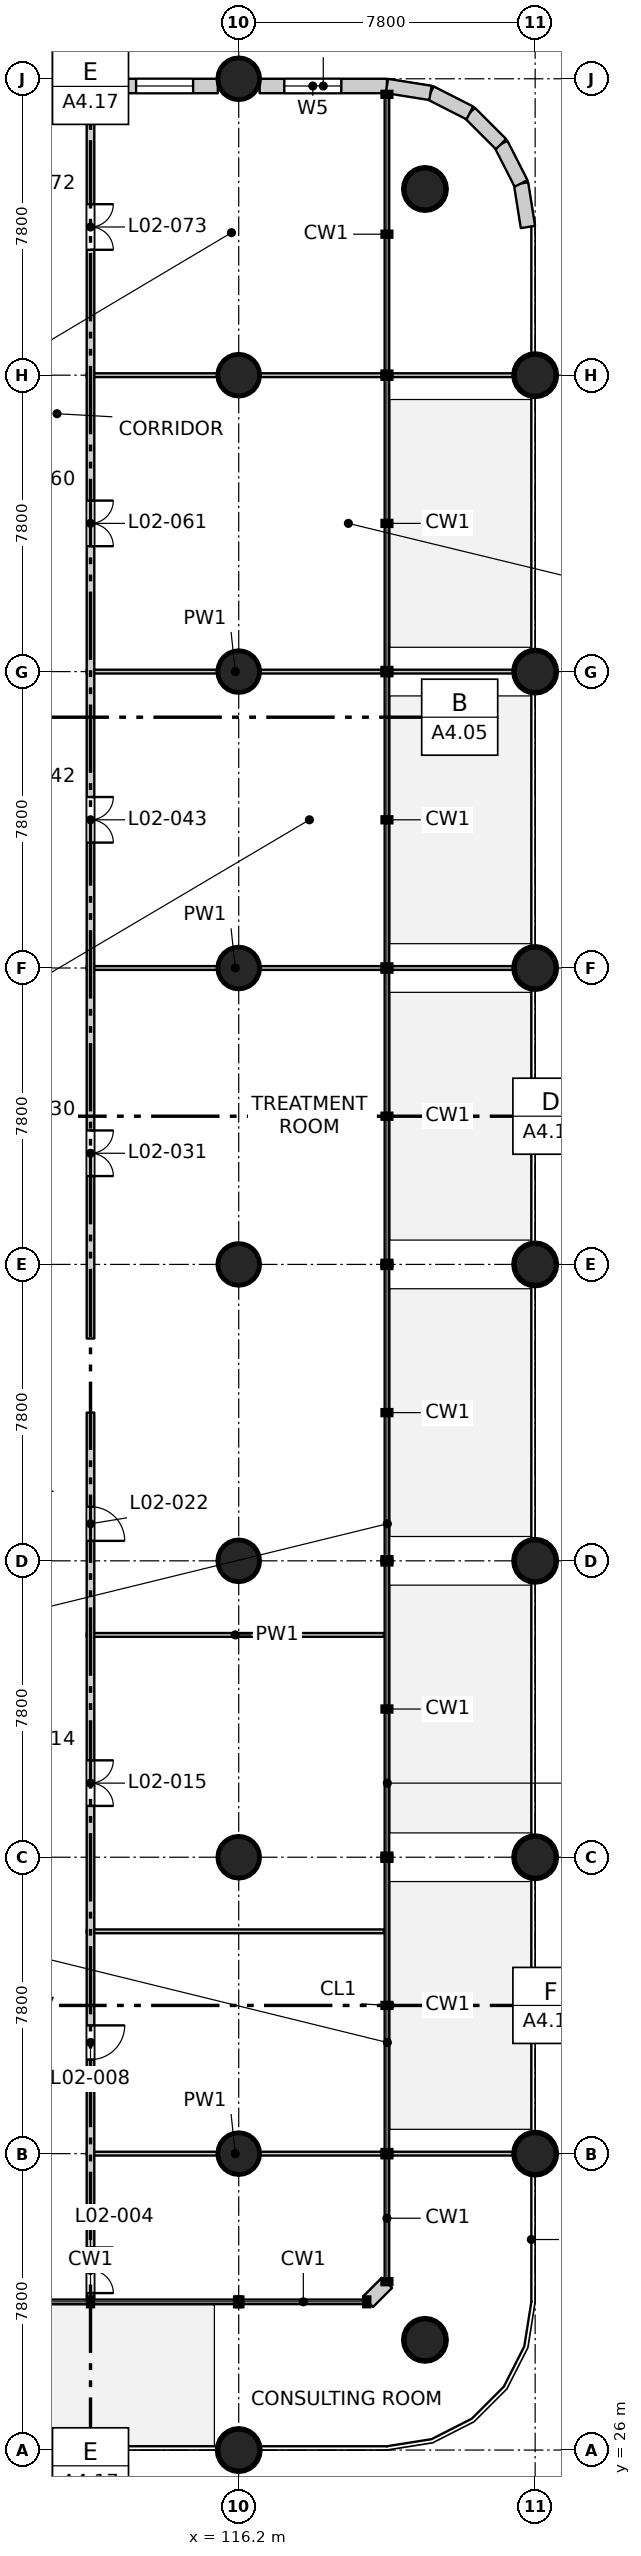
"""IFC4 building model, lengths in metres.
Left out: names, types, materials, properties, quantities, classifications, styles, units other than length and angle.
Written with IfcOpenShell. Run it as: python <this file> out.ifc"""

import sys

from ifc_helpers import new_model, si_unit, direction, frame, frame_2d, origin, origin_2d, place, context, subcontext, project, spatial, rectangle, circle, extrude, element, fill, save


model = new_model("IFC4")
c1 = context("Model", 3, precision=1e-05, world=origin(), true_north=direction((0.0, 1.0)))
c2 = subcontext(c1, "Body", "Model", "MODEL_VIEW")
j1 = project(units=[si_unit("LENGTHUNIT", "METRE"), si_unit("PLANEANGLEUNIT", "RADIAN")], contexts=[c1])
p1 = place(None, origin())
s1 = spatial("IfcSite", under=j1, at=p1, CompositionType="ELEMENT")
p2 = place(p1, origin())
s2 = spatial("IfcBuilding", under=s1, at=p2, CompositionType="ELEMENT")
p3 = place(p2, frame((0.0, 0.0, 10.5)))
s3 = spatial("IfcBuildingStorey", under=s2, at=p3, CompositionType="ELEMENT", Elevation=10.5)
for number, where, z_axis, x_axis in (
    (1, (116.2, 26.0, -0.3), (0.0, 0.0, 1.0), (1.0, 0.0, 0.0)),
    (2, (116.2, 33.8, -0.3), (0.0, 0.0, 1.0), (1.0, 0.0, 0.0)),
    (3, (116.2, 41.6, -0.3), (0.0, 0.0, 1.0), (1.0, 0.0, 0.0)),
    (4, (116.2, 49.4, -0.3), (0.0, 0.0, 1.0), (1.0, 0.0, 0.0)),
    (5, (116.2, 57.2, -0.3), (0.0, 0.0, 1.0), (1.0, 0.0, 0.0)),
    (6, (116.2, 65.0, -0.3), (0.0, 0.0, 1.0), (1.0, 0.0, 0.0)),
    (7, (116.2, 72.8, -0.3), (0.0, 0.0, 1.0), (1.0, 0.0, 0.0)),
    (8, (116.2, 80.6, -0.3), (0.0, 0.0, 1.0), (1.0, 0.0, 0.0)),
    (9, (116.2, 88.4, -0.3), (0.0, 0.0, 1.0), (1.0, 0.0, 0.0)),
    (10, (121.1, 28.9, -0.3), (0.0, 0.0, 1.0), (1.0, 0.0, 0.0)),
    (11, (124.0, 33.8, -0.3), (0.0, 0.0, 1.0), (1.0, 0.0, 0.0)),
    (12, (124.0, 41.6, -0.3), (0.0, 0.0, 1.0), (1.0, 0.0, 0.0)),
    (13, (124.0, 49.4, -0.3), (0.0, 0.0, 1.0), (1.0, 0.0, 0.0)),
    (14, (124.0, 57.2, -0.3), (0.0, 0.0, 1.0), (1.0, 0.0, 0.0)),
    (15, (124.0, 65.0, -0.3), (0.0, 0.0, 1.0), (1.0, 0.0, 0.0)),
    (16, (124.0, 72.8, -0.3), (0.0, 0.0, 1.0), (1.0, 0.0, 0.0)),
    (17, (124.0, 80.6, -0.3), (0.0, 0.0, 1.0), (1.0, 0.0, 0.0)),
    (18, (121.1, 85.5, -0.3), (0.0, 0.0, 1.0), (1.0, 0.0, 0.0)),
):
    element("IfcColumn", number, at=place(p3, frame(where, z_axis=z_axis, x_axis=x_axis)), inside=s3, PredefinedType="COLUMN", context=c2, shape_type="SweptSolid", body=[
        extrude(circle(Radius=0.55, at=origin_2d()), origin(), (0.0, 0.0, 1.0), 4.45),
    ])
p4 = place(p3, frame((119.6, 29.9, 0.0), z_axis=(0.0, 0.0, 1.0), x_axis=(0.707106781187, 0.707106781187, 0.0)))
e19 = element("IfcWall", 19, at=p4, inside=s3, PredefinedType="SOLIDWALL", context=c2, shape_type="SweptSolid", body=[
    extrude(rectangle(XDim=0.707, YDim=0.38, at=frame_2d((0.354, 0.0))), origin(), (0.0, 0.0, 1.0), 3.7),
])
p5 = place(p3, frame((101.2, 88.21, 0.0), z_axis=(0.0, 0.0, 1.0), x_axis=(1.0, 0.0, 0.0)))
e20 = element("IfcWall", 20, at=p5, inside=s3, PredefinedType="SOLIDWALL", context=c2, shape_type="SweptSolid", body=[
    extrude(rectangle(XDim=14.45, YDim=0.38, at=frame_2d((7.225, 0.0))), origin(), (0.0, 0.0, 1.0), 3.7),
])
p6 = place(p5, frame((0.6, 0.0, 0.9)))
e21 = element("IfcOpeningElement", 21, at=p6, cuts=e20, PredefinedType="OPENING", context=c2, shape_type="SweptSolid", body=[
    extrude(rectangle(XDim=1.5, YDim=1.5, at=frame_2d((0.75, 0.75))), frame((0.0, 0.2, 0.0), z_axis=(0.0, -1.0, 0.0), x_axis=(1.0, 0.0, 0.0)), (0.0, 0.0, 1.0), 0.4),
])
p7 = place(p5, frame((4.5, 0.0, 0.9)))
e22 = element("IfcOpeningElement", 22, at=p7, cuts=e20, PredefinedType="OPENING", context=c2, shape_type="SweptSolid", body=[
    extrude(rectangle(XDim=1.5, YDim=1.5, at=frame_2d((0.75, 0.75))), frame((0.0, 0.2, 0.0), z_axis=(0.0, -1.0, 0.0), x_axis=(1.0, 0.0, 0.0)), (0.0, 0.0, 1.0), 0.4),
])
p8 = place(p5, frame((12.3, 0.0, 0.9)))
e23 = element("IfcOpeningElement", 23, at=p8, cuts=e20, PredefinedType="OPENING", context=c2, shape_type="SweptSolid", body=[
    extrude(rectangle(XDim=1.5, YDim=1.5, at=frame_2d((0.75, 0.75))), frame((0.0, 0.2, 0.0), z_axis=(0.0, -1.0, 0.0), x_axis=(1.0, 0.0, 0.0)), (0.0, 0.0, 1.0), 0.4),
])
p9 = place(p3, frame((116.75, 88.21, 0.0), z_axis=(0.0, 0.0, 1.0), x_axis=(1.0, 0.0, 0.0)))
e24 = element("IfcWall", 24, at=p9, inside=s3, PredefinedType="SOLIDWALL", context=c2, shape_type="SweptSolid", body=[
    extrude(rectangle(XDim=3.35, YDim=0.38, at=frame_2d((1.675, 0.0))), origin(), (0.0, 0.0, 1.0), 3.7),
])
p10 = place(p9, frame((0.65, 0.0, 0.9)))
e25 = element("IfcOpeningElement", 25, at=p10, cuts=e24, PredefinedType="OPENING", context=c2, shape_type="SweptSolid", body=[
    extrude(rectangle(XDim=1.5, YDim=1.5, at=frame_2d((0.75, 0.75))), frame((0.0, 0.2, 0.0), z_axis=(0.0, -1.0, 0.0), x_axis=(1.0, 0.0, 0.0)), (0.0, 0.0, 1.0), 0.4),
])
p11 = place(p3, frame((123.81, 84.5, 0.0), z_axis=(0.0, 0.0, 1.0), x_axis=(-0.156480971952, 0.987680973502, 0.0)))
e26 = element("IfcWall", 26, at=p11, inside=s3, PredefinedType="SOLIDWALL", context=c2, shape_type="SweptSolid", body=[
    extrude(rectangle(XDim=1.161, YDim=0.38, at=frame_2d((0.581, 0.0))), origin(), (0.0, 0.0, 1.0), 3.7),
])
p12 = place(p3, frame((123.628, 85.646, 0.0), z_axis=(0.0, 0.0, 1.0), x_axis=(-0.453932083539, 0.891036286317, 0.0)))
e27 = element("IfcWall", 27, at=p12, inside=s3, PredefinedType="SOLIDWALL", context=c2, shape_type="SweptSolid", body=[
    extrude(rectangle(XDim=1.161, YDim=0.38, at=frame_2d((0.58, 0.0))), origin(), (0.0, 0.0, 1.0), 3.7),
])
for number, where, z_axis, x_axis in (
    (28, (123.102, 86.681, 0.0), (0.0, 0.0, 1.0), (-0.707, 0.707, 0.0)),
    (29, (122.281, 87.501, 0.0), (0.0, 0.0, 1.0), (-0.891, 0.454, 0.0)),
):
    element("IfcWall", number, at=place(p3, frame(where, z_axis=z_axis, x_axis=x_axis)), inside=s3, PredefinedType="SOLIDWALL", context=c2, shape_type="SweptSolid", body=[
        extrude(rectangle(XDim=1.161, YDim=0.38, at=frame_2d((0.581, 0.0))), origin(), (0.0, 0.0, 1.0), 3.7),
    ])
p13 = place(p3, frame((121.246, 88.028, 0.0), z_axis=(0.0, 0.0, 1.0), x_axis=(-0.987675821844, 0.156513484867, 0.0)))
e30 = element("IfcWall", 30, at=p13, inside=s3, PredefinedType="SOLIDWALL", context=c2, shape_type="SweptSolid", body=[
    extrude(rectangle(XDim=1.161, YDim=0.38, at=frame_2d((0.58, 0.0))), origin(), (0.0, 0.0, 1.0), 3.7),
])
p14 = place(p3, frame((112.2, 33.8, 0.0), z_axis=(0.0, 0.0, 1.0), x_axis=(1.0, 0.0, 0.0)))
e31 = element("IfcWall", 31, at=p14, inside=s3, PredefinedType="PARTITIONING", context=c2, shape_type="SweptSolid", body=[
    extrude(rectangle(XDim=7.82, YDim=0.1, at=frame_2d((3.91, 0.0))), origin(), (0.0, 0.0, 1.0), 4.15),
])
p15 = place(p3, frame((120.18, 33.8, 0.0), z_axis=(0.0, 0.0, 1.0), x_axis=(1.0, 0.0, 0.0)))
e32 = element("IfcWall", 32, at=p15, inside=s3, PredefinedType="PARTITIONING", context=c2, shape_type="SweptSolid", body=[
    extrude(rectangle(XDim=3.52, YDim=0.1, at=frame_2d((1.76, 0.0))), origin(), (0.0, 0.0, 1.0), 4.15),
])
p16 = place(p3, frame((112.2, 39.65, 0.0), z_axis=(0.0, 0.0, 1.0), x_axis=(1.0, 0.0, 0.0)))
e33 = element("IfcWall", 33, at=p16, inside=s3, PredefinedType="PARTITIONING", context=c2, shape_type="SweptSolid", body=[
    extrude(rectangle(XDim=7.82, YDim=0.1, at=frame_2d((3.91, 0.0))), origin(), (0.0, 0.0, 1.0), 4.15),
])
p17 = place(p3, frame((120.18, 39.65, 0.0), z_axis=(0.0, 0.0, 1.0), x_axis=(1.0, 0.0, 0.0)))
e34 = element("IfcWall", 34, at=p17, inside=s3, PredefinedType="PARTITIONING", context=c2, shape_type="SweptSolid", body=[
    extrude(rectangle(XDim=3.52, YDim=0.1, at=frame_2d((1.76, 0.0))), origin(), (0.0, 0.0, 1.0), 4.15),
])
p18 = place(p3, frame((112.2, 47.45, 0.0), z_axis=(0.0, 0.0, 1.0), x_axis=(1.0, 0.0, 0.0)))
e35 = element("IfcWall", 35, at=p18, inside=s3, PredefinedType="PARTITIONING", context=c2, shape_type="SweptSolid", body=[
    extrude(rectangle(XDim=7.82, YDim=0.1, at=frame_2d((3.91, 0.0))), origin(), (0.0, 0.0, 1.0), 4.15),
])
p19 = place(p3, frame((120.18, 47.45, 0.0), z_axis=(0.0, 0.0, 1.0), x_axis=(1.0, 0.0, 0.0)))
e36 = element("IfcWall", 36, at=p19, inside=s3, PredefinedType="PARTITIONING", context=c2, shape_type="SweptSolid", body=[
    extrude(rectangle(XDim=3.52, YDim=0.1, at=frame_2d((1.76, 0.0))), origin(), (0.0, 0.0, 1.0), 4.15),
])
p20 = place(p3, frame((112.2, 65.0, 0.0), z_axis=(0.0, 0.0, 1.0), x_axis=(1.0, 0.0, 0.0)))
e37 = element("IfcWall", 37, at=p20, inside=s3, PredefinedType="PARTITIONING", context=c2, shape_type="SweptSolid", body=[
    extrude(rectangle(XDim=7.82, YDim=0.1, at=frame_2d((3.91, 0.0))), origin(), (0.0, 0.0, 1.0), 4.15),
])
p21 = place(p3, frame((120.18, 65.0, 0.0), z_axis=(0.0, 0.0, 1.0), x_axis=(1.0, 0.0, 0.0)))
e38 = element("IfcWall", 38, at=p21, inside=s3, PredefinedType="PARTITIONING", context=c2, shape_type="SweptSolid", body=[
    extrude(rectangle(XDim=3.52, YDim=0.1, at=frame_2d((1.76, 0.0))), origin(), (0.0, 0.0, 1.0), 4.15),
])
p22 = place(p3, frame((112.2, 72.8, 0.0), z_axis=(0.0, 0.0, 1.0), x_axis=(1.0, 0.0, 0.0)))
e39 = element("IfcWall", 39, at=p22, inside=s3, PredefinedType="PARTITIONING", context=c2, shape_type="SweptSolid", body=[
    extrude(rectangle(XDim=7.82, YDim=0.1, at=frame_2d((3.91, 0.0))), origin(), (0.0, 0.0, 1.0), 4.15),
])
p23 = place(p3, frame((120.18, 72.8, 0.0), z_axis=(0.0, 0.0, 1.0), x_axis=(1.0, 0.0, 0.0)))
e40 = element("IfcWall", 40, at=p23, inside=s3, PredefinedType="PARTITIONING", context=c2, shape_type="SweptSolid", body=[
    extrude(rectangle(XDim=3.52, YDim=0.1, at=frame_2d((1.76, 0.0))), origin(), (0.0, 0.0, 1.0), 4.15),
])
p24 = place(p3, frame((112.2, 80.6, 0.0), z_axis=(0.0, 0.0, 1.0), x_axis=(1.0, 0.0, 0.0)))
e41 = element("IfcWall", 41, at=p24, inside=s3, PredefinedType="PARTITIONING", context=c2, shape_type="SweptSolid", body=[
    extrude(rectangle(XDim=7.82, YDim=0.1, at=frame_2d((3.91, 0.0))), origin(), (0.0, 0.0, 1.0), 4.15),
])
p25 = place(p3, frame((120.18, 80.6, 0.0), z_axis=(0.0, 0.0, 1.0), x_axis=(1.0, 0.0, 0.0)))
e42 = element("IfcWall", 42, at=p25, inside=s3, PredefinedType="PARTITIONING", context=c2, shape_type="SweptSolid", body=[
    extrude(rectangle(XDim=3.52, YDim=0.1, at=frame_2d((1.76, 0.0))), origin(), (0.0, 0.0, 1.0), 4.15),
])
p26 = place(p3, frame((112.3, 26.3, 0.0), z_axis=(0.0, 0.0, 1.0), x_axis=(0.0, 1.0, 0.0)))
e43 = element("IfcWall", 43, at=p26, inside=s3, PredefinedType="PARTITIONING", context=c2, shape_type="SweptSolid", body=[
    extrude(rectangle(XDim=3.52, YDim=0.2, at=frame_2d((1.76, 0.0))), origin(), (0.0, 0.0, 1.0), 4.15),
])
p27 = place(p3, frame((112.3, 29.98, 0.0), z_axis=(0.0, 0.0, 1.0), x_axis=(0.0, 1.0, 0.0)))
e44 = element("IfcWall", 44, at=p27, inside=s3, PredefinedType="PARTITIONING", context=c2, shape_type="SweptSolid", body=[
    extrude(rectangle(XDim=23.32, YDim=0.2, at=frame_2d((11.66, 0.0))), origin(), (0.0, 0.0, 1.0), 4.15),
])
p28 = place(p27, frame((0.15, 0.0, 0.0)))
e45 = element("IfcOpeningElement", 45, at=p28, cuts=e44, PredefinedType="OPENING", context=c2, shape_type="SweptSolid", body=[
    extrude(rectangle(XDim=1.2, YDim=2.1, at=frame_2d((0.6, 1.05))), frame((0.0, 0.11, 0.0), z_axis=(0.0, -1.0, 0.0), x_axis=(1.0, 0.0, 0.0)), (0.0, 0.0, 1.0), 0.22),
])
p29 = place(p27, frame((6.295, 0.0, 0.0)))
e46 = element("IfcOpeningElement", 46, at=p29, cuts=e44, PredefinedType="OPENING", context=c2, shape_type="SweptSolid", body=[
    extrude(rectangle(XDim=0.9, YDim=2.1, at=frame_2d((0.45, 1.05))), frame((0.0, 0.11, 0.0), z_axis=(0.0, -1.0, 0.0), x_axis=(1.0, 0.0, 0.0)), (0.0, 0.0, 1.0), 0.22),
])
p30 = place(p27, frame((12.97, 0.0, 0.0)))
e47 = element("IfcOpeningElement", 47, at=p30, cuts=e44, PredefinedType="OPENING", context=c2, shape_type="SweptSolid", body=[
    extrude(rectangle(XDim=1.2, YDim=2.1, at=frame_2d((0.6, 1.05))), frame((0.0, 0.11, 0.0), z_axis=(0.0, -1.0, 0.0), x_axis=(1.0, 0.0, 0.0)), (0.0, 0.0, 1.0), 0.22),
])
p31 = place(p27, frame((19.945, 0.0, 0.0)))
e48 = element("IfcOpeningElement", 48, at=p31, cuts=e44, PredefinedType="OPENING", context=c2, shape_type="SweptSolid", body=[
    extrude(rectangle(XDim=0.9, YDim=2.1, at=frame_2d((0.45, 1.05))), frame((0.0, 0.11, 0.0), z_axis=(0.0, -1.0, 0.0), x_axis=(1.0, 0.0, 0.0)), (0.0, 0.0, 1.0), 0.22),
])
p32 = place(p3, frame((112.3, 55.25, 0.0), z_axis=(0.0, 0.0, 1.0), x_axis=(0.0, 1.0, 0.0)))
e49 = element("IfcWall", 49, at=p32, inside=s3, PredefinedType="PARTITIONING", context=c2, shape_type="SweptSolid", body=[
    extrude(rectangle(XDim=32.85, YDim=0.2, at=frame_2d((16.425, 0.0))), origin(), (0.0, 0.0, 1.0), 4.15),
])
p33 = place(p32, frame((4.275, 0.0, 0.0)))
e50 = element("IfcOpeningElement", 50, at=p33, cuts=e49, PredefinedType="OPENING", context=c2, shape_type="SweptSolid", body=[
    extrude(rectangle(XDim=1.2, YDim=2.1, at=frame_2d((0.6, 1.05))), frame((0.0, 0.11, 0.0), z_axis=(0.0, -1.0, 0.0), x_axis=(1.0, 0.0, 0.0)), (0.0, 0.0, 1.0), 0.22),
])
p34 = place(p32, frame((13.05, 0.0, 0.0)))
e51 = element("IfcOpeningElement", 51, at=p34, cuts=e49, PredefinedType="OPENING", context=c2, shape_type="SweptSolid", body=[
    extrude(rectangle(XDim=1.2, YDim=2.1, at=frame_2d((0.6, 1.05))), frame((0.0, 0.11, 0.0), z_axis=(0.0, -1.0, 0.0), x_axis=(1.0, 0.0, 0.0)), (0.0, 0.0, 1.0), 0.22),
])
p35 = place(p32, frame((20.85, 0.0, 0.0)))
e52 = element("IfcOpeningElement", 52, at=p35, cuts=e49, PredefinedType="OPENING", context=c2, shape_type="SweptSolid", body=[
    extrude(rectangle(XDim=1.2, YDim=2.1, at=frame_2d((0.6, 1.05))), frame((0.0, 0.11, 0.0), z_axis=(0.0, -1.0, 0.0), x_axis=(1.0, 0.0, 0.0)), (0.0, 0.0, 1.0), 0.22),
])
p36 = place(p32, frame((28.65, 0.0, 0.0)))
e53 = element("IfcOpeningElement", 53, at=p36, cuts=e49, PredefinedType="OPENING", context=c2, shape_type="SweptSolid", body=[
    extrude(rectangle(XDim=1.2, YDim=2.1, at=frame_2d((0.6, 1.05))), frame((0.0, 0.11, 0.0), z_axis=(0.0, -1.0, 0.0), x_axis=(1.0, 0.0, 0.0)), (0.0, 0.0, 1.0), 0.22),
])
p37 = place(p8, origin())
e54 = element("IfcWindow", 54, at=p37, inside=s3, PartitioningType="SINGLE_PANEL", PredefinedType="WINDOW", context=c2, shape_type="SweptSolid", body=[
    extrude(rectangle(XDim=1.5, YDim=1.5, at=frame_2d((0.75, 0.75))), frame((0.0, 0.03, 0.0), z_axis=(0.0, -1.0, 0.0), x_axis=(1.0, 0.0, 0.0)), (0.0, 0.0, 1.0), 0.06),
])
fill(e23, e54)
p38 = place(p10, origin())
e55 = element("IfcWindow", 55, at=p38, inside=s3, PartitioningType="SINGLE_PANEL", PredefinedType="WINDOW", context=c2, shape_type="SweptSolid", body=[
    extrude(rectangle(XDim=1.5, YDim=1.5, at=frame_2d((0.75, 0.75))), frame((0.0, 0.03, 0.0), z_axis=(0.0, -1.0, 0.0), x_axis=(1.0, 0.0, 0.0)), (0.0, 0.0, 1.0), 0.06),
])
fill(e25, e55)
p39 = place(p28, origin())
e56 = element("IfcDoor", 56, at=p39, inside=s3, OperationType="DOUBLE_DOOR_SINGLE_SWING", PredefinedType="DOOR", context=c2, shape_type="SweptSolid", body=[
    extrude(rectangle(XDim=1.2, YDim=2.1, at=frame_2d((0.6, 1.05))), frame((0.0, 0.025, 0.0), z_axis=(0.0, -1.0, 0.0), x_axis=(1.0, 0.0, 0.0)), (0.0, 0.0, 1.0), 0.05),
])
fill(e45, e56)
p40 = place(p29, origin())
e57 = element("IfcDoor", 57, at=p40, inside=s3, OperationType="SINGLE_SWING_LEFT", PredefinedType="DOOR", context=c2, shape_type="SweptSolid", body=[
    extrude(rectangle(XDim=0.9, YDim=2.1, at=frame_2d((0.45, 1.05))), frame((0.0, 0.025, 0.0), z_axis=(0.0, -1.0, 0.0), x_axis=(1.0, 0.0, 0.0)), (0.0, 0.0, 1.0), 0.05),
])
fill(e46, e57)
p41 = place(p30, origin())
e58 = element("IfcDoor", 58, at=p41, inside=s3, OperationType="DOUBLE_DOOR_SINGLE_SWING", PredefinedType="DOOR", context=c2, shape_type="SweptSolid", body=[
    extrude(rectangle(XDim=1.2, YDim=2.1, at=frame_2d((0.6, 1.05))), frame((0.0, 0.025, 0.0), z_axis=(0.0, -1.0, 0.0), x_axis=(1.0, 0.0, 0.0)), (0.0, 0.0, 1.0), 0.05),
])
fill(e47, e58)
p42 = place(p31, origin())
e59 = element("IfcDoor", 59, at=p42, inside=s3, OperationType="SINGLE_SWING_RIGHT", PredefinedType="DOOR", context=c2, shape_type="SweptSolid", body=[
    extrude(rectangle(XDim=0.9, YDim=2.1, at=frame_2d((0.45, 1.05))), frame((0.0, 0.025, 0.0), z_axis=(0.0, -1.0, 0.0), x_axis=(1.0, 0.0, 0.0)), (0.0, 0.0, 1.0), 0.05),
])
fill(e48, e59)
p43 = place(p33, origin())
e60 = element("IfcDoor", 60, at=p43, inside=s3, OperationType="DOUBLE_DOOR_SINGLE_SWING", PredefinedType="DOOR", context=c2, shape_type="SweptSolid", body=[
    extrude(rectangle(XDim=1.2, YDim=2.1, at=frame_2d((0.6, 1.05))), frame((0.0, 0.025, 0.0), z_axis=(0.0, -1.0, 0.0), x_axis=(1.0, 0.0, 0.0)), (0.0, 0.0, 1.0), 0.05),
])
fill(e50, e60)
p44 = place(p34, origin())
e61 = element("IfcDoor", 61, at=p44, inside=s3, OperationType="DOUBLE_DOOR_SINGLE_SWING", PredefinedType="DOOR", context=c2, shape_type="SweptSolid", body=[
    extrude(rectangle(XDim=1.2, YDim=2.1, at=frame_2d((0.6, 1.05))), frame((0.0, 0.025, 0.0), z_axis=(0.0, -1.0, 0.0), x_axis=(1.0, 0.0, 0.0)), (0.0, 0.0, 1.0), 0.05),
])
fill(e51, e61)
p45 = place(p35, origin())
e62 = element("IfcDoor", 62, at=p45, inside=s3, OperationType="DOUBLE_DOOR_SINGLE_SWING", PredefinedType="DOOR", context=c2, shape_type="SweptSolid", body=[
    extrude(rectangle(XDim=1.2, YDim=2.1, at=frame_2d((0.6, 1.05))), frame((0.0, 0.025, 0.0), z_axis=(0.0, -1.0, 0.0), x_axis=(1.0, 0.0, 0.0)), (0.0, 0.0, 1.0), 0.05),
])
fill(e52, e62)
p46 = place(p36, origin())
e63 = element("IfcDoor", 63, at=p46, inside=s3, OperationType="DOUBLE_DOOR_SINGLE_SWING", PredefinedType="DOOR", context=c2, shape_type="SweptSolid", body=[
    extrude(rectangle(XDim=1.2, YDim=2.1, at=frame_2d((0.6, 1.05))), frame((0.0, 0.025, 0.0), z_axis=(0.0, -1.0, 0.0), x_axis=(1.0, 0.0, 0.0)), (0.0, 0.0, 1.0), 0.05),
])
fill(e53, e63)
save(model, sys.argv[1])
